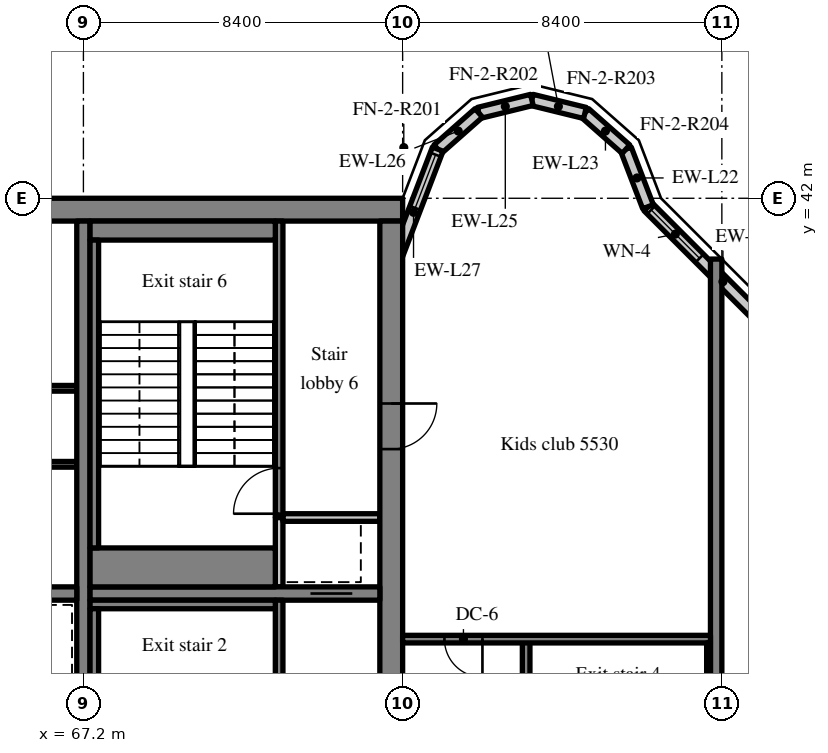
"""IFC4 building model, lengths in metres.
Left out: names, types, materials, properties, quantities, classifications, styles, units other than length and angle.
Written with IfcOpenShell. Run it as: python <this file> out.ifc"""

import sys

from ifc_helpers import new_model, si_unit, direction, frame, frame_2d, origin, place, context, subcontext, project, spatial, rectangle, extrude, source, transform, mapped, element, fill, save


model = new_model("IFC4")
c1 = context("Model", 3, precision=1e-05, world=origin(), true_north=direction((0.0, 1.0)))
c2 = subcontext(c1, "Body", "Model", "MODEL_VIEW")
j1 = project(units=[si_unit("LENGTHUNIT", "METRE"), si_unit("PLANEANGLEUNIT", "RADIAN")], contexts=[c1])
p1 = place(None, origin())
s1 = spatial("IfcSite", under=j1, at=p1, CompositionType="ELEMENT")
p2 = place(p1, origin())
s2 = spatial("IfcBuilding", under=s1, at=p2, CompositionType="ELEMENT")
p3 = place(p2, frame((0.0, 0.0, 229.6)))
s3 = spatial("IfcBuildingStorey", under=s2, at=p3, CompositionType="ELEMENT", Elevation=229.6)
m1 = source(origin(), c2, "Body", "SweptSolid", [
    extrude(rectangle(XDim=50.4, YDim=0.6, at=frame_2d((25.2, 0.0))), origin(), (0.0, 0.0, 1.0), 3.62),
])
p4 = place(p3, frame((25.2, 41.7, 0.0), z_axis=(0.0, 0.0, 1.0), x_axis=(1.0, 0.0, 0.0)))
e1 = element("IfcWall", 1, at=p4, inside=s3, PredefinedType="SHEAR", context=c2, shape_type="MappedRepresentation", body=[
    mapped(m1, transform((0.0, 0.0, 0.0), scale=1.0)),
])
m2 = source(origin(), c2, "Body", "SweptSolid", [
    extrude(rectangle(XDim=18.8, YDim=0.6, at=frame_2d((9.4, 0.0))), origin(), (0.0, 0.0, 1.0), 3.62),
])
p5 = place(p3, frame((75.3, 22.6, 0.0), z_axis=(0.0, 0.0, 1.0), x_axis=(0.0, 1.0, 0.0)))
e2 = element("IfcWall", 2, at=p5, inside=s3, PredefinedType="SHEAR", context=c2, shape_type="MappedRepresentation", body=[
    mapped(m2, transform((0.0, 0.0, 0.0), scale=1.0)),
])
m3 = source(origin(), c2, "Body", "SweptSolid", [
    extrude(rectangle(XDim=1.2, YDim=2.1, at=frame_2d((0.6, 1.05))), frame((0.0, 0.31, 0.0), z_axis=(0.0, -1.0, 0.0), x_axis=(1.0, 0.0, 0.0)), (0.0, 0.0, 1.0), 0.62),
])
p6 = place(p5, frame((12.8, 0.0, 0.0)))
e3 = element("IfcOpeningElement", 3, at=p6, cuts=e2, PredefinedType="OPENING", context=c2, shape_type="MappedRepresentation", body=[
    mapped(m3, transform((0.0, 0.0, 0.0), scale=1.0)),
])
m4 = source(origin(), c2, "Body", "SweptSolid", [
    extrude(rectangle(XDim=18.8, YDim=0.35, at=frame_2d((9.4, 0.0))), origin(), (0.0, 0.0, 1.0), 3.62),
])
p7 = place(p3, frame((67.2, 22.6, 0.0), z_axis=(0.0, 0.0, 1.0), x_axis=(0.0, 1.0, 0.0)))
e4 = element("IfcWall", 4, at=p7, inside=s3, PredefinedType="SHEAR", context=c2, shape_type="MappedRepresentation", body=[
    mapped(m4, transform((0.0, 0.0, 0.0), scale=1.0)),
])
m5 = source(origin(), c2, "Body", "SweptSolid", [
    extrude(rectangle(XDim=16.45, YDim=0.35, at=frame_2d((8.225, 0.0))), origin(), (0.0, 0.0, 1.0), 3.62),
])
p8 = place(p3, frame((50.575, 31.6, 0.0), z_axis=(0.0, 0.0, 1.0), x_axis=(1.0, 0.0, 0.0)))
e5 = element("IfcWall", 5, at=p8, inside=s3, PredefinedType="SHEAR", context=c2, shape_type="MappedRepresentation", body=[
    mapped(m5, transform((0.0, 0.0, 0.0), scale=1.0)),
])
m6 = source(origin(), c2, "Body", "SweptSolid", [
    extrude(rectangle(XDim=1.0, YDim=2.1, at=frame_2d((0.5, 1.05))), frame((0.0, 0.185, 0.0), z_axis=(0.0, -1.0, 0.0), x_axis=(1.0, 0.0, 0.0)), (0.0, 0.0, 1.0), 0.37),
])
p9 = place(p8, frame((0.613, 0.0, 0.0)))
e6 = element("IfcOpeningElement", 6, at=p9, cuts=e5, PredefinedType="OPENING", context=c2, shape_type="MappedRepresentation", body=[
    mapped(m6, transform((0.0, 0.0, 0.0), scale=1.0)),
])
m7 = source(origin(), c2, "Body", "SweptSolid", [
    extrude(rectangle(XDim=7.625, YDim=0.35, at=frame_2d((3.812, 0.0))), origin(), (0.0, 0.0, 1.0), 3.62),
])
p10 = place(p3, frame((67.375, 31.6, 0.0), z_axis=(0.0, 0.0, 1.0), x_axis=(1.0, 0.0, 0.0)))
e7 = element("IfcWall", 7, at=p10, inside=s3, PredefinedType="SHEAR", context=c2, shape_type="MappedRepresentation", body=[
    mapped(m7, transform((0.0, 0.0, 0.0), scale=1.0)),
])
m8 = source(origin(), c2, "Body", "SweptSolid", [
    extrude(rectangle(XDim=1.1, YDim=2.1, at=frame_2d((0.55, 1.05))), frame((0.0, 0.185, 0.0), z_axis=(0.0, -1.0, 0.0), x_axis=(1.0, 0.0, 0.0)), (0.0, 0.0, 1.0), 0.37),
])
p11 = place(p10, frame((5.8, 0.0, 0.0)))
e8 = element("IfcOpeningElement", 8, at=p11, cuts=e7, PredefinedType="OPENING", context=c2, shape_type="MappedRepresentation", body=[
    mapped(m8, transform((0.0, 0.0, 0.0), scale=1.0)),
])
m9 = source(origin(), c2, "Body", "SweptSolid", [
    extrude(rectangle(XDim=18.4, YDim=0.3, at=frame_2d((9.2, 0.0))), origin(), (0.0, 0.0, 1.0), 3.62),
])
p12 = place(p3, frame((83.85, 22.0, 0.0), z_axis=(0.0, 0.0, 1.0), x_axis=(0.0, 1.0, 0.0)))
e9 = element("IfcWall", 9, at=p12, inside=s3, PredefinedType="SHEAR", context=c2, shape_type="MappedRepresentation", body=[
    mapped(m9, transform((0.0, 0.0, 0.0), scale=1.0)),
])
m10 = source(origin(), c2, "Body", "SweptSolid", [
    extrude(rectangle(XDim=5.576, YDim=0.3, at=frame_2d((2.788, 0.0))), origin(), (0.0, 0.0, 1.0), 3.62),
])
p13 = place(p3, frame((86.0, 37.834, 0.0), z_axis=(0.0, 0.0, 1.0), x_axis=(-0.707106781187, 0.707106781187, 0.0)))
e10 = element("IfcWall", 10, at=p13, inside=s3, PredefinedType="SOLIDWALL", context=c2, shape_type="MappedRepresentation", body=[
    mapped(m10, transform((0.0, 0.0, 0.0), scale=1.0)),
])
m11 = source(origin(), c2, "Body", "SweptSolid", [
    extrude(rectangle(XDim=1.8, YDim=1.5, at=frame_2d((0.9, 0.75))), frame((0.0, 0.16, 0.0), z_axis=(0.0, -1.0, 0.0), x_axis=(1.0, 0.0, 0.0)), (0.0, 0.0, 1.0), 0.32),
])
p14 = place(p13, frame((3.658, 0.0, 0.9)))
e11 = element("IfcOpeningElement", 11, at=p14, cuts=e10, PredefinedType="OPENING", context=c2, shape_type="MappedRepresentation", body=[
    mapped(m11, transform((0.0, 0.0, 0.0), scale=1.0)),
])
m12 = source(origin(), c2, "Body", "SweptSolid", [
    extrude(rectangle(XDim=1.622, YDim=0.3, at=frame_2d((0.811, 0.0))), origin(), (0.0, 0.0, 1.0), 3.62),
])
p15 = place(p3, frame((82.057, 41.777, 0.0), z_axis=(0.0, 0.0, 1.0), x_axis=(-0.357778527068, 0.933806471154, 0.0)))
e12 = element("IfcWall", 12, at=p15, inside=s3, PredefinedType="SOLIDWALL", context=c2, shape_type="MappedRepresentation", body=[
    mapped(m12, transform((0.0, 0.0, 0.0), scale=1.0)),
])
m13 = source(origin(), c2, "Body", "SweptSolid", [
    extrude(rectangle(XDim=1.44, YDim=0.3, at=frame_2d((0.72, 0.0))), origin(), (0.0, 0.0, 1.0), 3.62),
])
p16 = place(p3, frame((81.477, 43.292, 0.0), z_axis=(0.0, 0.0, 1.0), x_axis=(-0.74957555648, 0.661918790432, 0.0)))
e13 = element("IfcWall", 13, at=p16, inside=s3, PredefinedType="SOLIDWALL", context=c2, shape_type="MappedRepresentation", body=[
    mapped(m13, transform((0.0, 0.0, 0.0), scale=1.0)),
])
m14 = source(origin(), c2, "Body", "SweptSolid", [
    extrude(rectangle(XDim=1.439, YDim=0.3, at=frame_2d((0.719, 0.0))), origin(), (0.0, 0.0, 1.0), 3.62),
])
for number, where, z_axis, x_axis in (
    (14, (80.397, 44.245, 0.0), (0.0, 0.0, 1.0), (-0.971, 0.238, 0.0)),
    (15, (79.0, 44.588, 0.0), (0.0, 0.0, 1.0), (-0.971, -0.238, 0.0)),
):
    element("IfcWall", number, at=place(p3, frame(where, z_axis=z_axis, x_axis=x_axis)), inside=s3, PredefinedType="SOLIDWALL", context=c2, shape_type="MappedRepresentation", body=[
        mapped(m14, transform((0.0, 0.0, 0.0), scale=1.0)),
    ])
p17 = place(p3, frame((77.603, 44.245, 0.0), z_axis=(0.0, 0.0, 1.0), x_axis=(-0.74957555648, -0.661918790432, 0.0)))
e16 = element("IfcWall", 16, at=p17, inside=s3, PredefinedType="SOLIDWALL", context=c2, shape_type="MappedRepresentation", body=[
    mapped(m13, transform((0.0, 0.0, 0.0), scale=1.0)),
])
m15 = source(origin(), c2, "Body", "SweptSolid", [
    extrude(rectangle(XDim=3.559, YDim=0.3, at=frame_2d((1.78, 0.0))), origin(), (0.0, 0.0, 1.0), 3.62),
])
p18 = place(p3, frame((76.523, 43.292, 0.0), z_axis=(0.0, 0.0, 1.0), x_axis=(-0.35779745313, -0.933799219604, 0.0)))
e17 = element("IfcWall", 17, at=p18, inside=s3, PredefinedType="SOLIDWALL", context=c2, shape_type="MappedRepresentation", body=[
    mapped(m15, transform((0.0, 0.0, 0.0), scale=1.0)),
])
m16 = source(origin(), c2, "Body", "SweptSolid", [
    extrude(rectangle(XDim=1.5, YDim=2.0, at=frame_2d((0.75, 1.0))), frame((0.0, 0.16, 0.0), z_axis=(0.0, -1.0, 0.0), x_axis=(1.0, 0.0, 0.0)), (0.0, 0.0, 1.0), 0.32),
])
p19 = place(p18, frame((0.156, 0.0, 0.9)))
e18 = element("IfcOpeningElement", 18, at=p19, cuts=e17, PredefinedType="OPENING", context=c2, shape_type="MappedRepresentation", body=[
    mapped(m16, transform((0.0, 0.0, 0.0), scale=1.0)),
])
m17 = source(origin(), c2, "Body", "SweptSolid", [
    extrude(rectangle(XDim=14.225, YDim=0.15, at=frame_2d((7.112, 0.0))), origin(), (0.0, 0.0, 1.0), 3.62),
])
p20 = place(p3, frame((67.025, 35.0, 0.0), z_axis=(0.0, 0.0, 1.0), x_axis=(-1.0, 0.0, 0.0)))
e19 = element("IfcWall", 19, at=p20, inside=s3, PredefinedType="PARTITIONING", context=c2, shape_type="MappedRepresentation", body=[
    mapped(m17, transform((0.0, 0.0, 0.0), scale=1.0)),
])
m18 = source(origin(), c2, "Body", "SweptSolid", [
    extrude(rectangle(XDim=0.9, YDim=2.1, at=frame_2d((0.45, 1.05))), frame((0.0, 0.085, 0.0), z_axis=(0.0, -1.0, 0.0), x_axis=(1.0, 0.0, 0.0)), (0.0, 0.0, 1.0), 0.17),
])
p21 = place(p20, frame((6.625, 0.0, 0.0)))
e20 = element("IfcOpeningElement", 20, at=p21, cuts=e19, PredefinedType="OPENING", context=c2, shape_type="MappedRepresentation", body=[
    mapped(m18, transform((0.0, 0.0, 0.0), scale=1.0)),
])
m19 = source(origin(), c2, "Body", "SweptSolid", [
    extrude(rectangle(XDim=16.45, YDim=0.15, at=frame_2d((8.225, 0.0))), origin(), (0.0, 0.0, 1.0), 3.62),
])
p22 = place(p3, frame((67.025, 37.0, 0.0), z_axis=(0.0, 0.0, 1.0), x_axis=(-1.0, 0.0, 0.0)))
e21 = element("IfcWall", 21, at=p22, inside=s3, PredefinedType="PARTITIONING", context=c2, shape_type="MappedRepresentation", body=[
    mapped(m19, transform((0.0, 0.0, 0.0), scale=1.0)),
])
p23 = place(p22, frame((3.251, 0.0, 0.0)))
e22 = element("IfcOpeningElement", 22, at=p23, cuts=e21, PredefinedType="OPENING", context=c2, shape_type="MappedRepresentation", body=[
    mapped(m18, transform((0.0, 0.0, 0.0), scale=1.0)),
])
p24 = place(p22, frame((8.186, 0.0, 0.0)))
e23 = element("IfcOpeningElement", 23, at=p24, cuts=e21, PredefinedType="OPENING", context=c2, shape_type="MappedRepresentation", body=[
    mapped(m18, transform((0.0, 0.0, 0.0), scale=1.0)),
])
p25 = place(p22, frame((11.476, 0.0, 0.0)))
e24 = element("IfcOpeningElement", 24, at=p25, cuts=e21, PredefinedType="OPENING", context=c2, shape_type="MappedRepresentation", body=[
    mapped(m18, transform((0.0, 0.0, 0.0), scale=1.0)),
])
p26 = place(p22, frame((14.766, 0.0, 0.0)))
e25 = element("IfcOpeningElement", 25, at=p26, cuts=e21, PredefinedType="OPENING", context=c2, shape_type="MappedRepresentation", body=[
    mapped(m18, transform((0.0, 0.0, 0.0), scale=1.0)),
])
m20 = source(origin(), c2, "Body", "SweptSolid", [
    extrude(rectangle(XDim=8.825, YDim=0.2, at=frame_2d((4.413, 0.0))), origin(), (0.0, 0.0, 1.0), 3.62),
])
p27 = place(p3, frame((72.35, 22.6, 0.0), z_axis=(0.0, 0.0, 1.0), x_axis=(0.0, 1.0, 0.0)))
e26 = element("IfcWall", 26, at=p27, inside=s3, PredefinedType="SOLIDWALL", context=c2, shape_type="MappedRepresentation", body=[
    mapped(m20, transform((0.0, 0.0, 0.0), scale=1.0)),
])
m21 = source(origin(), c2, "Body", "SweptSolid", [
    extrude(rectangle(XDim=1.2, YDim=2.1, at=frame_2d((0.6, 1.05))), frame((0.0, 0.11, 0.0), z_axis=(0.0, -1.0, 0.0), x_axis=(1.0, 0.0, 0.0)), (0.0, 0.0, 1.0), 0.22),
])
p28 = place(p27, frame((1.0, 0.0, 0.0)))
e27 = element("IfcOpeningElement", 27, at=p28, cuts=e26, PredefinedType="OPENING", context=c2, shape_type="MappedRepresentation", body=[
    mapped(m21, transform((0.0, 0.0, 0.0), scale=1.0)),
])
m22 = source(origin(), c2, "Body", "SweptSolid", [
    extrude(rectangle(XDim=1.825, YDim=0.2, at=frame_2d((0.913, 0.0))), origin(), (0.0, 0.0, 1.0), 3.62),
])
p29 = place(p3, frame((72.35, 31.775, 0.0), z_axis=(0.0, 0.0, 1.0), x_axis=(0.0, 1.0, 0.0)))
e28 = element("IfcWall", 28, at=p29, inside=s3, PredefinedType="SOLIDWALL", context=c2, shape_type="MappedRepresentation", body=[
    mapped(m22, transform((0.0, 0.0, 0.0), scale=1.0)),
])
m23 = source(origin(), c2, "Body", "SweptSolid", [
    extrude(rectangle(XDim=2.55, YDim=0.2, at=frame_2d((1.275, 0.0))), origin(), (0.0, 0.0, 1.0), 3.62),
])
p30 = place(p3, frame((72.45, 33.6, 0.0), z_axis=(0.0, 0.0, 1.0), x_axis=(1.0, 0.0, 0.0)))
e29 = element("IfcWall", 29, at=p30, inside=s3, PredefinedType="SOLIDWALL", context=c2, shape_type="MappedRepresentation", body=[
    mapped(m23, transform((0.0, 0.0, 0.0), scale=1.0)),
])
m24 = source(origin(), c2, "Body", "SweptSolid", [
    extrude(rectangle(XDim=7.8, YDim=0.2, at=frame_2d((3.9, 0.0))), origin(), (0.0, 0.0, 1.0), 3.62),
])
p31 = place(p3, frame((72.35, 33.6, 0.0), z_axis=(0.0, 0.0, 1.0), x_axis=(0.0, 1.0, 0.0)))
e30 = element("IfcWall", 30, at=p31, inside=s3, PredefinedType="SOLIDWALL", context=c2, shape_type="MappedRepresentation", body=[
    mapped(m24, transform((0.0, 0.0, 0.0), scale=1.0)),
])
p32 = place(p31, frame((0.1, 0.0, 0.0)))
e31 = element("IfcOpeningElement", 31, at=p32, cuts=e30, PredefinedType="OPENING", context=c2, shape_type="MappedRepresentation", body=[
    mapped(m21, transform((0.0, 0.0, 0.0), scale=1.0)),
])
m25 = source(origin(), c2, "Body", "SweptSolid", [
    extrude(rectangle(XDim=8.3, YDim=0.2, at=frame_2d((4.15, 0.0))), origin(), (0.0, 0.0, 1.0), 3.62),
])
p33 = place(p3, frame((78.85, 22.1, 0.0), z_axis=(0.0, 0.0, 1.0), x_axis=(0.0, 1.0, 0.0)))
e32 = element("IfcWall", 32, at=p33, inside=s3, PredefinedType="SOLIDWALL", context=c2, shape_type="MappedRepresentation", body=[
    mapped(m25, transform((0.0, 0.0, 0.0), scale=1.0)),
])
p34 = place(p33, frame((0.6, 0.0, 0.0)))
e33 = element("IfcOpeningElement", 33, at=p34, cuts=e32, PredefinedType="OPENING", context=c2, shape_type="MappedRepresentation", body=[
    mapped(m21, transform((0.0, 0.0, 0.0), scale=1.0)),
])
m26 = source(origin(), c2, "Body", "SweptSolid", [
    extrude(rectangle(XDim=8.1, YDim=0.2, at=frame_2d((4.05, 0.0))), origin(), (0.0, 0.0, 1.0), 3.62),
])
p35 = place(p3, frame((83.7, 30.4, 0.0), z_axis=(0.0, 0.0, 1.0), x_axis=(-1.0, 0.0, 0.0)))
e34 = element("IfcWall", 34, at=p35, inside=s3, PredefinedType="SOLIDWALL", context=c2, shape_type="MappedRepresentation", body=[
    mapped(m26, transform((0.0, 0.0, 0.0), scale=1.0)),
])
m27 = source(origin(), c2, "Body", "SweptSolid", [
    extrude(rectangle(XDim=1.0, YDim=2.1, at=frame_2d((0.5, 1.05))), frame((0.0, 0.11, 0.0), z_axis=(0.0, -1.0, 0.0), x_axis=(1.0, 0.0, 0.0)), (0.0, 0.0, 1.0), 0.22),
])
p36 = place(p35, frame((6.0, 0.0, 0.0)))
e35 = element("IfcOpeningElement", 35, at=p36, cuts=e34, PredefinedType="OPENING", context=c2, shape_type="MappedRepresentation", body=[
    mapped(m27, transform((0.0, 0.0, 0.0), scale=1.0)),
])
m28 = source(origin(), c2, "Body", "SweptSolid", [
    extrude(rectangle(XDim=4.875, YDim=0.225, at=frame_2d((2.438, 0.0))), origin(), (0.0, 0.0, 1.0), 3.62),
])
p37 = place(p3, frame((67.375, 31.312, 0.0), z_axis=(0.0, 0.0, 1.0), x_axis=(1.0, 0.0, 0.0)))
e36 = element("IfcWall", 36, at=p37, inside=s3, PredefinedType="SOLIDWALL", context=c2, shape_type="MappedRepresentation", body=[
    mapped(m28, transform((0.0, 0.0, 0.0), scale=1.0)),
])
m29 = source(origin(), c2, "Body", "SweptSolid", [
    extrude(rectangle(XDim=8.1, YDim=0.225, at=frame_2d((4.05, 0.0))), origin(), (0.0, 0.0, 1.0), 3.62),
])
p38 = place(p3, frame((67.487, 23.1, 0.0), z_axis=(0.0, 0.0, 1.0), x_axis=(0.0, 1.0, 0.0)))
e37 = element("IfcWall", 37, at=p38, inside=s3, PredefinedType="SOLIDWALL", context=c2, shape_type="MappedRepresentation", body=[
    mapped(m29, transform((0.0, 0.0, 0.0), scale=1.0)),
])
m30 = source(origin(), c2, "Body", "SweptSolid", [
    extrude(rectangle(XDim=4.875, YDim=0.5, at=frame_2d((2.438, 0.0))), origin(), (0.0, 0.0, 1.0), 3.62),
])
p39 = place(p3, frame((67.375, 41.15, 0.0), z_axis=(0.0, 0.0, 1.0), x_axis=(1.0, 0.0, 0.0)))
e38 = element("IfcWall", 38, at=p39, inside=s3, PredefinedType="SOLIDWALL", context=c2, shape_type="MappedRepresentation", body=[
    mapped(m30, transform((0.0, 0.0, 0.0), scale=1.0)),
])
m31 = source(origin(), c2, "Body", "SweptSolid", [
    extrude(rectangle(XDim=4.875, YDim=1.025, at=frame_2d((2.438, 0.0))), origin(), (0.0, 0.0, 1.0), 3.62),
])
p40 = place(p3, frame((67.375, 32.287, 0.0), z_axis=(0.0, 0.0, 1.0), x_axis=(1.0, 0.0, 0.0)))
e39 = element("IfcWall", 39, at=p40, inside=s3, PredefinedType="SOLIDWALL", context=c2, shape_type="MappedRepresentation", body=[
    mapped(m31, transform((0.0, 0.0, 0.0), scale=1.0)),
])
p41 = place(p3, frame((67.487, 32.8, 0.0), z_axis=(0.0, 0.0, 1.0), x_axis=(0.0, 1.0, 0.0)))
e40 = element("IfcWall", 40, at=p41, inside=s3, PredefinedType="SOLIDWALL", context=c2, shape_type="MappedRepresentation", body=[
    mapped(m29, transform((0.0, 0.0, 0.0), scale=1.0)),
])
m32 = source(origin(), c2, "Body", "SweptSolid", [
    extrude(rectangle(XDim=8.1, YDim=0.1, at=frame_2d((4.05, 0.0))), origin(), (0.0, 0.0, 1.0), 3.62),
])
p42 = place(p3, frame((83.65, 22.2, 0.0), z_axis=(0.0, 0.0, 1.0), x_axis=(0.0, 1.0, 0.0)))
e41 = element("IfcWall", 41, at=p42, inside=s3, PredefinedType="SOLIDWALL", context=c2, shape_type="MappedRepresentation", body=[
    mapped(m32, transform((0.0, 0.0, 0.0), scale=1.0)),
])
m33 = source(origin(), c2, "Body", "SweptSolid", [
    extrude(rectangle(XDim=1.8, YDim=1.5, at=frame_2d((0.9, 0.75))), frame((0.0, 0.03, 0.0), z_axis=(0.0, -1.0, 0.0), x_axis=(1.0, 0.0, 0.0)), (0.0, 0.0, 1.0), 0.06),
])
p43 = place(p14, origin())
e42 = element("IfcWindow", 42, at=p43, inside=s3, PartitioningType="SINGLE_PANEL", PredefinedType="WINDOW", context=c2, shape_type="MappedRepresentation", body=[
    mapped(m33, transform((0.0, 0.0, 0.0), scale=1.0)),
])
fill(e11, e42)
m34 = source(origin(), c2, "Body", "SweptSolid", [
    extrude(rectangle(XDim=1.5, YDim=2.0, at=frame_2d((0.75, 1.0))), frame((0.0, 0.03, 0.0), z_axis=(0.0, -1.0, 0.0), x_axis=(1.0, 0.0, 0.0)), (0.0, 0.0, 1.0), 0.06),
])
p44 = place(p19, origin())
e43 = element("IfcWindow", 43, at=p44, inside=s3, PartitioningType="SINGLE_PANEL", PredefinedType="WINDOW", context=c2, shape_type="MappedRepresentation", body=[
    mapped(m34, transform((0.0, 0.0, 0.0), scale=1.0)),
])
fill(e18, e43)
m35 = source(origin(), c2, "Body", "SweptSolid", [
    extrude(rectangle(XDim=1.1, YDim=2.1, at=frame_2d((0.55, 1.05))), frame((0.0, 0.025, 0.0), z_axis=(0.0, -1.0, 0.0), x_axis=(1.0, 0.0, 0.0)), (0.0, 0.0, 1.0), 0.05),
])
p45 = place(p11, origin())
e44 = element("IfcDoor", 44, at=p45, inside=s3, OperationType="SLIDING_TO_LEFT", PredefinedType="DOOR", context=c2, shape_type="MappedRepresentation", body=[
    mapped(m35, transform((0.0, 0.0, 0.0), scale=1.0)),
])
fill(e8, e44)
m36 = source(origin(), c2, "Body", "SweptSolid", [
    extrude(rectangle(XDim=1.2, YDim=2.1, at=frame_2d((0.6, 1.05))), frame((0.0, 0.025, 0.0), z_axis=(0.0, -1.0, 0.0), x_axis=(1.0, 0.0, 0.0)), (0.0, 0.0, 1.0), 0.05),
])
p46 = place(p32, origin())
e45 = element("IfcDoor", 45, at=p46, inside=s3, OperationType="SINGLE_SWING_LEFT", PredefinedType="DOOR", context=c2, shape_type="MappedRepresentation", body=[
    mapped(m36, transform((0.0, 0.0, 0.0), scale=1.0)),
])
fill(e31, e45)
p47 = place(p6, origin())
e46 = element("IfcDoor", 46, at=p47, inside=s3, OperationType="SINGLE_SWING_RIGHT", PredefinedType="DOOR", context=c2, shape_type="MappedRepresentation", body=[
    mapped(m36, transform((0.0, 0.0, 0.0), scale=1.0)),
])
fill(e3, e46)
m37 = source(origin(), c2, "Body", "SweptSolid", [
    extrude(rectangle(XDim=1.0, YDim=2.1, at=frame_2d((0.5, 1.05))), frame((0.0, 0.025, 0.0), z_axis=(0.0, -1.0, 0.0), x_axis=(1.0, 0.0, 0.0)), (0.0, 0.0, 1.0), 0.05),
])
p48 = place(p36, origin())
e47 = element("IfcDoor", 47, at=p48, inside=s3, OperationType="SINGLE_SWING_LEFT", PredefinedType="DOOR", context=c2, shape_type="MappedRepresentation", body=[
    mapped(m37, transform((0.0, 0.0, 0.0), scale=1.0)),
])
fill(e35, e47)
save(model, sys.argv[1])
